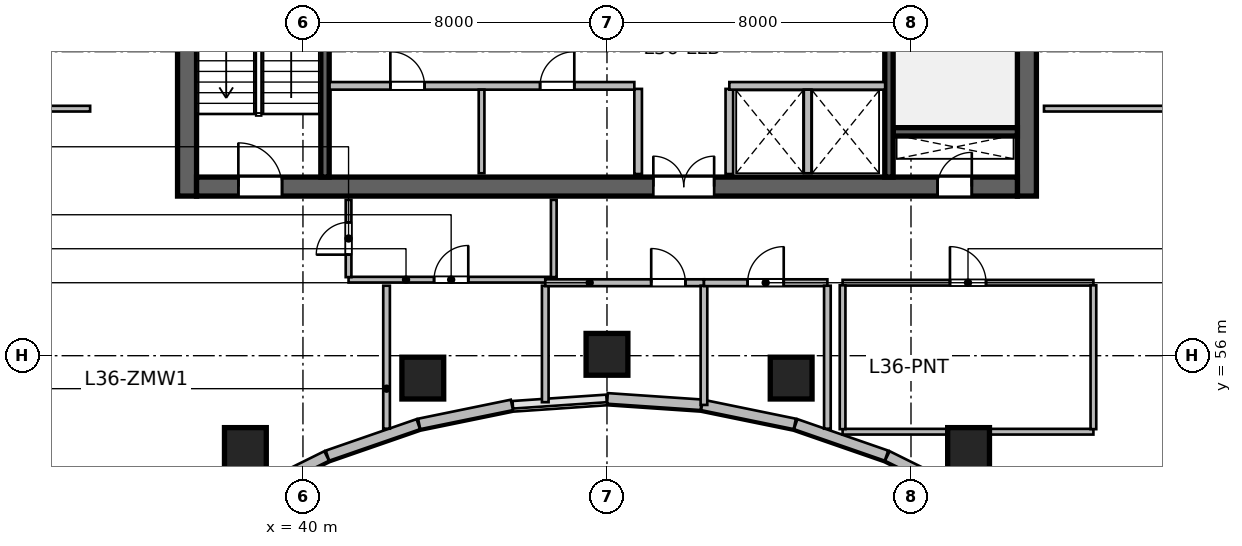
"""IFC4 building model, lengths in metres.
Left out: names, types, materials, properties, quantities, classifications, styles, units other than length and angle.
Written with IfcOpenShell. Run it as: python <this file> out.ifc"""

import sys

from ifc_helpers import new_model, si_unit, direction, frame, frame_2d, origin, origin_2d, place, context, subcontext, project, spatial, rectangle, circle, extrude, source, transform, mapped, element, fill, save


model = new_model("IFC4")
c1 = context("Model", 3, precision=1e-05, world=origin(), true_north=direction((0.0, 1.0)))
c2 = subcontext(c1, "Body", "Model", "MODEL_VIEW")
j1 = project(units=[si_unit("LENGTHUNIT", "METRE"), si_unit("PLANEANGLEUNIT", "RADIAN")], contexts=[c1])
p1 = place(None, origin())
s1 = spatial("IfcSite", under=j1, at=p1, CompositionType="ELEMENT")
p2 = place(p1, origin())
s2 = spatial("IfcBuilding", under=s1, at=p2, CompositionType="ELEMENT")
p3 = place(p2, frame((0.0, 0.0, 150.6)))
s3 = spatial("IfcBuildingStorey", under=s2, at=p3, CompositionType="ELEMENT", Elevation=150.6)
m1 = source(origin(), c2, "Body", "SweptSolid", [
    extrude(rectangle(XDim=12.0, YDim=0.5, at=frame_2d((6.0, 0.0))), origin(), (0.0, 0.0, 1.0), 3.9),
])
for number, where, z_axis, x_axis in (
    (1, (36.95, 60.2, 0.0), (0.0, 0.0, 1.0), (0.0, 1.0, 0.0)),
    (2, (59.05, 60.2, 0.0), (0.0, 0.0, 1.0), (0.0, 1.0, 0.0)),
):
    element("IfcWall", number, at=place(p3, frame(where, z_axis=z_axis, x_axis=x_axis)), inside=s3, PredefinedType="SHEAR", context=c2, shape_type="MappedRepresentation", body=[
        mapped(m1, transform((0.0, 0.0, 0.0), scale=1.0)),
    ])
m2 = source(origin(), c2, "Body", "SweptSolid", [
    extrude(rectangle(XDim=21.6, YDim=0.5, at=frame_2d((10.8, 0.0))), origin(), (0.0, 0.0, 1.0), 3.9),
])
p4 = place(p3, frame((37.2, 60.45, 0.0), z_axis=(0.0, 0.0, 1.0), x_axis=(1.0, 0.0, 0.0)))
e3 = element("IfcWall", 3, at=p4, inside=s3, PredefinedType="SHEAR", context=c2, shape_type="MappedRepresentation", body=[
    mapped(m2, transform((0.0, 0.0, 0.0), scale=1.0)),
])
p5 = place(p4, frame((1.1, 0.0, 0.0)))
e4 = element("IfcOpeningElement", 4, at=p5, cuts=e3, PredefinedType="OPENING", context=c2, shape_type="SweptSolid", body=[
    extrude(rectangle(XDim=1.15, YDim=2.15, at=frame_2d((0.575, 1.075))), frame((0.0, 0.26, 0.0), z_axis=(0.0, -1.0, 0.0), x_axis=(1.0, 0.0, 0.0)), (0.0, 0.0, 1.0), 0.52),
])
p6 = place(p4, frame((19.5, 0.0, 0.0)))
e5 = element("IfcOpeningElement", 5, at=p6, cuts=e3, PredefinedType="OPENING", context=c2, shape_type="SweptSolid", body=[
    extrude(rectangle(XDim=0.9, YDim=2.1, at=frame_2d((0.45, 1.05))), frame((0.0, 0.26, 0.0), z_axis=(0.0, -1.0, 0.0), x_axis=(1.0, 0.0, 0.0)), (0.0, 0.0, 1.0), 0.52),
])
p7 = place(p4, frame((12.02, 0.0, 0.0)))
e6 = element("IfcOpeningElement", 6, at=p7, cuts=e3, PredefinedType="OPENING", context=c2, shape_type="SweptSolid", body=[
    extrude(rectangle(XDim=1.6, YDim=2.15, at=frame_2d((0.8, 1.075))), frame((0.0, 0.26, 0.0), z_axis=(0.0, -1.0, 0.0), x_axis=(1.0, 0.0, 0.0)), (0.0, 0.0, 1.0), 0.52),
])
m3 = source(origin(), c2, "Body", "SweptSolid", [
    extrude(rectangle(XDim=3.27, YDim=0.22, at=frame_2d((1.635, 0.0))), origin(), (0.0, 0.0, 1.0), 3.9),
])
p8 = place(p3, frame((55.53, 61.89, 0.0), z_axis=(0.0, 0.0, 1.0), x_axis=(1.0, 0.0, 0.0)))
e7 = element("IfcWall", 7, at=p8, inside=s3, PredefinedType="SHEAR", context=c2, shape_type="MappedRepresentation", body=[
    mapped(m3, transform((0.0, 0.0, 0.0), scale=1.0)),
])
m4 = source(origin(), c2, "Body", "SweptSolid", [
    extrude(rectangle(XDim=11.0, YDim=0.22, at=frame_2d((5.5, 0.0))), origin(), (0.0, 0.0, 1.0), 3.9),
])
p9 = place(p3, frame((40.58, 60.7, 0.0), z_axis=(0.0, 0.0, 1.0), x_axis=(0.0, 1.0, 0.0)))
e8 = element("IfcWall", 8, at=p9, inside=s3, PredefinedType="SHEAR", context=c2, shape_type="MappedRepresentation", body=[
    mapped(m4, transform((0.0, 0.0, 0.0), scale=1.0)),
])
p10 = place(p3, frame((55.42, 60.7, 0.0), z_axis=(0.0, 0.0, 1.0), x_axis=(0.0, 1.0, 0.0)))
e9 = element("IfcWall", 9, at=p10, inside=s3, PredefinedType="SHEAR", context=c2, shape_type="MappedRepresentation", body=[
    mapped(m4, transform((0.0, 0.0, 0.0), scale=1.0)),
])
p11 = place(p10, frame((9.545, 0.0, 0.0)))
e10 = element("IfcOpeningElement", 10, at=p11, cuts=e9, PredefinedType="OPENING", context=c2, shape_type="SweptSolid", body=[
    extrude(rectangle(XDim=1.15, YDim=2.15, at=frame_2d((0.575, 1.075))), frame((0.0, 0.12, 0.0), z_axis=(0.0, -1.0, 0.0), x_axis=(1.0, 0.0, 0.0)), (0.0, 0.0, 1.0), 0.24),
])
m5 = source(origin(), c2, "Body", "SweptSolid", [
    extrude(circle(Radius=0.55, at=origin_2d()), origin(), (0.0, 0.0, 1.0), 3.9),
])
for number, where, z_axis, x_axis in (
    (11, (38.485, 53.558, 0.0), (0.0, 0.0, 1.0), (-0.289, 0.957, 0.0)),
    (12, (43.154, 55.411, 0.0), (0.0, 0.0, 1.0), (-0.143, 0.99, 0.0)),
    (13, (48.0, 56.036, 0.0), (0.0, 0.0, 1.0), (0.0, 1.0, 0.0)),
    (14, (52.846, 55.411, 0.0), (0.0, 0.0, 1.0), (0.143, 0.99, 0.0)),
    (15, (57.515, 53.558, 0.0), (0.0, 0.0, 1.0), (0.289, 0.957, 0.0)),
):
    element("IfcColumn", number, at=place(p3, frame(where, z_axis=z_axis, x_axis=x_axis)), inside=s3, PredefinedType="COLUMN", context=c2, shape_type="MappedRepresentation", body=[
        mapped(m5, transform((0.0, 0.0, 0.0), scale=1.0)),
    ])
m6 = source(origin(), c2, "Body", "SweptSolid", [
    extrude(rectangle(XDim=2.584, YDim=0.28, at=frame_2d((1.292, 0.0))), origin(), (0.0, 0.0, 1.0), 3.65),
])
p12 = place(p3, frame((57.692, 52.213, 0.0), z_axis=(0.0, 0.0, 1.0), x_axis=(-0.895989792847, 0.44407464588, 0.0)))
e16 = element("IfcWall", 16, at=p12, inside=s3, PredefinedType="SOLIDWALL", context=c2, shape_type="MappedRepresentation", body=[
    mapped(m6, transform((0.0, 0.0, 0.0), scale=1.0)),
])
m7 = source(origin(), c2, "Body", "SweptSolid", [
    extrude(rectangle(XDim=2.53, YDim=0.28, at=frame_2d((1.265, 0.0))), origin(), (0.0, 0.0, 1.0), 3.65),
])
p13 = place(p3, frame((55.355, 53.37, 0.0), z_axis=(0.0, 0.0, 1.0), x_axis=(-0.944872429646, 0.327438683872, 0.0)))
e17 = element("IfcWall", 17, at=p13, inside=s3, PredefinedType="SOLIDWALL", context=c2, shape_type="MappedRepresentation", body=[
    mapped(m7, transform((0.0, 0.0, 0.0), scale=1.0)),
])
m8 = source(origin(), c2, "Body", "SweptSolid", [
    extrude(rectangle(XDim=2.491, YDim=0.28, at=frame_2d((1.246, 0.0))), origin(), (0.0, 0.0, 1.0), 3.65),
])
p14 = place(p3, frame((52.942, 54.205, 0.0), z_axis=(0.0, 0.0, 1.0), x_axis=(-0.979630885979, 0.200806691214, 0.0)))
e18 = element("IfcWall", 18, at=p14, inside=s3, PredefinedType="SOLIDWALL", context=c2, shape_type="MappedRepresentation", body=[
    mapped(m8, transform((0.0, 0.0, 0.0), scale=1.0)),
])
m9 = source(origin(), c2, "Body", "SweptSolid", [
    extrude(rectangle(XDim=2.471, YDim=0.28, at=frame_2d((1.236, 0.0))), origin(), (0.0, 0.0, 1.0), 3.65),
])
p15 = place(p3, frame((50.478, 54.708, 0.0), z_axis=(0.0, 0.0, 1.0), x_axis=(-0.997708006929, 0.067666335123, 0.0)))
e19 = element("IfcWall", 19, at=p15, inside=s3, PredefinedType="SOLIDWALL", context=c2, shape_type="MappedRepresentation", body=[
    mapped(m9, transform((0.0, 0.0, 0.0), scale=1.0)),
])
p16 = place(p3, frame((45.498, 54.705, 0.0), z_axis=(0.0, 0.0, 1.0), x_axis=(-0.979630885979, -0.200806691214, 0.0)))
e20 = element("IfcWall", 20, at=p16, inside=s3, PredefinedType="SOLIDWALL", context=c2, shape_type="MappedRepresentation", body=[
    mapped(m8, transform((0.0, 0.0, 0.0), scale=1.0)),
])
p17 = place(p3, frame((43.035, 54.198, 0.0), z_axis=(0.0, 0.0, 1.0), x_axis=(-0.944872429646, -0.327438683872, 0.0)))
e21 = element("IfcWall", 21, at=p17, inside=s3, PredefinedType="SOLIDWALL", context=c2, shape_type="MappedRepresentation", body=[
    mapped(m7, transform((0.0, 0.0, 0.0), scale=1.0)),
])
p18 = place(p3, frame((40.624, 53.361, 0.0), z_axis=(0.0, 0.0, 1.0), x_axis=(-0.895989792847, -0.44407464588, 0.0)))
e22 = element("IfcWall", 22, at=p18, inside=s3, PredefinedType="SOLIDWALL", context=c2, shape_type="MappedRepresentation", body=[
    mapped(m6, transform((0.0, 0.0, 0.0), scale=1.0)),
])
m10 = source(origin(), c2, "Body", "SweptSolid", [
    extrude(rectangle(XDim=2.24, YDim=0.2, at=frame_2d((1.12, 0.0))), origin(), (0.0, 0.0, 1.0), 3.65),
])
for number, where, z_axis, x_axis in (
    (23, (48.82, 60.78, 0.0), (0.0, 0.0, 1.0), (0.0, 1.0, 0.0)),
    (24, (51.22, 60.78, 0.0), (0.0, 0.0, 1.0), (0.0, 1.0, 0.0)),
):
    element("IfcWall", number, at=place(p3, frame(where, z_axis=z_axis, x_axis=x_axis)), inside=s3, PredefinedType="SOLIDWALL", context=c2, shape_type="MappedRepresentation", body=[
        mapped(m10, transform((0.0, 0.0, 0.0), scale=1.0)),
    ])
m11 = source(origin(), c2, "Body", "SweptSolid", [
    extrude(rectangle(XDim=8.02, YDim=0.2, at=frame_2d((4.01, 0.0))), origin(), (0.0, 0.0, 1.0), 3.65),
])
p19 = place(p3, frame((40.7, 63.1, 0.0), z_axis=(0.0, 0.0, 1.0), x_axis=(1.0, 0.0, 0.0)))
e25 = element("IfcWall", 25, at=p19, inside=s3, PredefinedType="SOLIDWALL", context=c2, shape_type="MappedRepresentation", body=[
    mapped(m11, transform((0.0, 0.0, 0.0), scale=1.0)),
])
p20 = place(p19, frame((1.6, 0.0, 0.0)))
e26 = element("IfcOpeningElement", 26, at=p20, cuts=e25, PredefinedType="OPENING", context=c2, shape_type="SweptSolid", body=[
    extrude(rectangle(XDim=0.9, YDim=2.1, at=frame_2d((0.45, 1.05))), frame((0.0, 0.11, 0.0), z_axis=(0.0, -1.0, 0.0), x_axis=(1.0, 0.0, 0.0)), (0.0, 0.0, 1.0), 0.22),
])
p21 = place(p19, frame((5.54, 0.0, 0.0)))
e27 = element("IfcOpeningElement", 27, at=p21, cuts=e25, PredefinedType="OPENING", context=c2, shape_type="SweptSolid", body=[
    extrude(rectangle(XDim=0.9, YDim=2.1, at=frame_2d((0.45, 1.05))), frame((0.0, 0.11, 0.0), z_axis=(0.0, -1.0, 0.0), x_axis=(1.0, 0.0, 0.0)), (0.0, 0.0, 1.0), 0.22),
])
m12 = source(origin(), c2, "Body", "SweptSolid", [
    extrude(rectangle(XDim=4.1, YDim=0.2, at=frame_2d((2.05, 0.0))), origin(), (0.0, 0.0, 1.0), 3.65),
])
p22 = place(p3, frame((51.22, 63.1, 0.0), z_axis=(0.0, 0.0, 1.0), x_axis=(1.0, 0.0, 0.0)))
e28 = element("IfcWall", 28, at=p22, inside=s3, PredefinedType="SOLIDWALL", context=c2, shape_type="MappedRepresentation", body=[
    mapped(m12, transform((0.0, 0.0, 0.0), scale=1.0)),
])
m13 = source(origin(), c2, "Body", "SweptSolid", [
    extrude(rectangle(XDim=2.2, YDim=0.15, at=frame_2d((1.1, 0.0))), origin(), (0.0, 0.0, 1.0), 3.65),
])
p23 = place(p3, frame((44.7, 60.8, 0.0), z_axis=(0.0, 0.0, 1.0), x_axis=(0.0, 1.0, 0.0)))
e29 = element("IfcWall", 29, at=p23, inside=s3, PredefinedType="PARTITIONING", context=c2, shape_type="MappedRepresentation", body=[
    mapped(m13, transform((0.0, 0.0, 0.0), scale=1.0)),
])
m14 = source(origin(), c2, "Body", "SweptSolid", [
    extrude(rectangle(XDim=2.2, YDim=0.2, at=frame_2d((1.1, 0.0))), origin(), (0.0, 0.0, 1.0), 3.65),
])
p24 = place(p3, frame((53.28, 60.8, 0.0), z_axis=(0.0, 0.0, 1.0), x_axis=(0.0, 1.0, 0.0)))
e30 = element("IfcWall", 30, at=p24, inside=s3, PredefinedType="SOLIDWALL", context=c2, shape_type="MappedRepresentation", body=[
    mapped(m14, transform((0.0, 0.0, 0.0), scale=1.0)),
])
m15 = source(origin(), c2, "Body", "SweptSolid", [
    extrude(rectangle(XDim=5.4, YDim=0.15, at=frame_2d((2.7, 0.0))), origin(), (0.0, 0.0, 1.0), 3.65),
])
p25 = place(p3, frame((41.2, 58.0, 0.0), z_axis=(0.0, 0.0, 1.0), x_axis=(1.0, 0.0, 0.0)))
e31 = element("IfcWall", 31, at=p25, inside=s3, PredefinedType="PARTITIONING", context=c2, shape_type="MappedRepresentation", body=[
    mapped(m15, transform((0.0, 0.0, 0.0), scale=1.0)),
])
p26 = place(p25, frame((2.25, 0.0, 0.0)))
e32 = element("IfcOpeningElement", 32, at=p26, cuts=e31, PredefinedType="OPENING", context=c2, shape_type="SweptSolid", body=[
    extrude(rectangle(XDim=0.9, YDim=2.08, at=frame_2d((0.45, 1.04))), frame((0.0, 0.085, 0.0), z_axis=(0.0, -1.0, 0.0), x_axis=(1.0, 0.0, 0.0)), (0.0, 0.0, 1.0), 0.17),
])
m16 = source(origin(), c2, "Body", "SweptSolid", [
    extrude(rectangle(XDim=2.033, YDim=0.15, at=frame_2d((1.016, 0.0))), origin(), (0.0, 0.0, 1.0), 3.65),
])
p27 = place(p3, frame((41.2, 58.067, 0.0), z_axis=(0.0, 0.0, 1.0), x_axis=(0.0, 1.0, 0.0)))
e33 = element("IfcWall", 33, at=p27, inside=s3, PredefinedType="PARTITIONING", context=c2, shape_type="MappedRepresentation", body=[
    mapped(m16, transform((0.0, 0.0, 0.0), scale=1.0)),
])
p28 = place(p27, frame((0.591, 0.0, 0.0)))
e34 = element("IfcOpeningElement", 34, at=p28, cuts=e33, PredefinedType="OPENING", context=c2, shape_type="SweptSolid", body=[
    extrude(rectangle(XDim=0.85, YDim=2.1, at=frame_2d((0.425, 1.05))), frame((0.0, 0.085, 0.0), z_axis=(0.0, -1.0, 0.0), x_axis=(1.0, 0.0, 0.0)), (0.0, 0.0, 1.0), 0.17),
])
p29 = place(p3, frame((46.6, 58.067, 0.0), z_axis=(0.0, 0.0, 1.0), x_axis=(0.0, 1.0, 0.0)))
e35 = element("IfcWall", 35, at=p29, inside=s3, PredefinedType="PARTITIONING", context=c2, shape_type="MappedRepresentation", body=[
    mapped(m16, transform((0.0, 0.0, 0.0), scale=1.0)),
])
m17 = source(origin(), c2, "Body", "SweptSolid", [
    extrude(rectangle(XDim=3.763, YDim=0.175, at=frame_2d((1.881, 0.0))), origin(), (0.0, 0.0, 1.0), 3.65),
])
p30 = place(p3, frame((42.2, 54.079, 0.0), z_axis=(0.0, 0.0, 1.0), x_axis=(0.0, 1.0, 0.0)))
e36 = element("IfcWall", 36, at=p30, inside=s3, PredefinedType="PARTITIONING", context=c2, shape_type="MappedRepresentation", body=[
    mapped(m17, transform((0.0, 0.0, 0.0), scale=1.0)),
])
m18 = source(origin(), c2, "Body", "SweptSolid", [
    extrude(rectangle(XDim=3.065, YDim=0.175, at=frame_2d((1.533, 0.0))), origin(), (0.0, 0.0, 1.0), 3.65),
])
p31 = place(p3, frame((46.376, 54.776, 0.0), z_axis=(0.0, 0.0, 1.0), x_axis=(0.0, 1.0, 0.0)))
e37 = element("IfcWall", 37, at=p31, inside=s3, PredefinedType="PARTITIONING", context=c2, shape_type="MappedRepresentation", body=[
    mapped(m18, transform((0.0, 0.0, 0.0), scale=1.0)),
])
m19 = source(origin(), c2, "Body", "SweptSolid", [
    extrude(rectangle(XDim=4.176, YDim=0.18, at=frame_2d((2.088, 0.0))), origin(), (0.0, 0.0, 1.0), 3.65),
])
p32 = place(p3, frame((46.376, 57.92, 0.0), z_axis=(0.0, 0.0, 1.0), x_axis=(1.0, 0.0, 0.0)))
e38 = element("IfcWall", 38, at=p32, inside=s3, PredefinedType="PLUMBINGWALL", context=c2, shape_type="MappedRepresentation", body=[
    mapped(m19, transform((0.0, 0.0, 0.0), scale=1.0)),
])
p33 = place(p32, frame((2.788, 0.0, 0.0)))
e39 = element("IfcOpeningElement", 39, at=p33, cuts=e38, PredefinedType="OPENING", context=c2, shape_type="SweptSolid", body=[
    extrude(rectangle(XDim=0.9, YDim=2.08, at=frame_2d((0.45, 1.04))), frame((0.0, 0.1, 0.0), z_axis=(0.0, -1.0, 0.0), x_axis=(1.0, 0.0, 0.0)), (0.0, 0.0, 1.0), 0.2),
])
m20 = source(origin(), c2, "Body", "SweptSolid", [
    extrude(rectangle(XDim=3.136, YDim=0.175, at=frame_2d((1.568, 0.0))), origin(), (0.0, 0.0, 1.0), 3.65),
])
p34 = place(p3, frame((50.552, 54.705, 0.0), z_axis=(0.0, 0.0, 1.0), x_axis=(0.0, 1.0, 0.0)))
e40 = element("IfcWall", 40, at=p34, inside=s3, PredefinedType="PARTITIONING", context=c2, shape_type="MappedRepresentation", body=[
    mapped(m20, transform((0.0, 0.0, 0.0), scale=1.0)),
])
m21 = source(origin(), c2, "Body", "SweptSolid", [
    extrude(rectangle(XDim=3.248, YDim=0.18, at=frame_2d((1.624, 0.0))), origin(), (0.0, 0.0, 1.0), 3.65),
])
p35 = place(p3, frame((50.552, 57.92, 0.0), z_axis=(0.0, 0.0, 1.0), x_axis=(1.0, 0.0, 0.0)))
e41 = element("IfcWall", 41, at=p35, inside=s3, PredefinedType="PLUMBINGWALL", context=c2, shape_type="MappedRepresentation", body=[
    mapped(m21, transform((0.0, 0.0, 0.0), scale=1.0)),
])
p36 = place(p35, frame((1.149, 0.0, 0.0)))
e42 = element("IfcOpeningElement", 42, at=p36, cuts=e41, PredefinedType="OPENING", context=c2, shape_type="SweptSolid", body=[
    extrude(rectangle(XDim=0.95, YDim=2.12, at=frame_2d((0.475, 1.06))), frame((0.0, 0.1, 0.0), z_axis=(0.0, -1.0, 0.0), x_axis=(1.0, 0.0, 0.0)), (0.0, 0.0, 1.0), 0.2),
])
p37 = place(p3, frame((53.8, 54.079, 0.0), z_axis=(0.0, 0.0, 1.0), x_axis=(0.0, 1.0, 0.0)))
e43 = element("IfcWall", 43, at=p37, inside=s3, PredefinedType="PARTITIONING", context=c2, shape_type="MappedRepresentation", body=[
    mapped(m17, transform((0.0, 0.0, 0.0), scale=1.0)),
])
m22 = source(origin(), c2, "Body", "SweptSolid", [
    extrude(rectangle(XDim=6.6, YDim=0.15, at=frame_2d((3.3, 0.0))), origin(), (0.0, 0.0, 1.0), 3.095),
])
p38 = place(p3, frame((54.2, 54.0, 0.0), z_axis=(0.0, 0.0, 1.0), x_axis=(1.0, 0.0, 0.0)))
e44 = element("IfcWall", 44, at=p38, inside=s3, PredefinedType="PARTITIONING", context=c2, shape_type="MappedRepresentation", body=[
    mapped(m22, transform((0.0, 0.0, 0.0), scale=1.0)),
])
m23 = source(origin(), c2, "Body", "SweptSolid", [
    extrude(rectangle(XDim=6.6, YDim=0.15, at=frame_2d((3.3, 0.0))), origin(), (0.0, 0.0, 1.0), 3.65),
])
p39 = place(p3, frame((54.2, 57.92, 0.0), z_axis=(0.0, 0.0, 1.0), x_axis=(1.0, 0.0, 0.0)))
e45 = element("IfcWall", 45, at=p39, inside=s3, PredefinedType="PARTITIONING", context=c2, shape_type="MappedRepresentation", body=[
    mapped(m23, transform((0.0, 0.0, 0.0), scale=1.0)),
])
p40 = place(p39, frame((2.825, 0.0, 0.0)))
e46 = element("IfcOpeningElement", 46, at=p40, cuts=e45, PredefinedType="OPENING", context=c2, shape_type="SweptSolid", body=[
    extrude(rectangle(XDim=0.95, YDim=2.1, at=frame_2d((0.475, 1.05))), frame((0.0, 0.085, 0.0), z_axis=(0.0, -1.0, 0.0), x_axis=(1.0, 0.0, 0.0)), (0.0, 0.0, 1.0), 0.17),
])
m24 = source(origin(), c2, "Body", "SweptSolid", [
    extrude(rectangle(XDim=3.785, YDim=0.15, at=frame_2d((1.893, 0.0))), origin(), (0.0, 0.0, 1.0), 3.65),
])
for number, where, z_axis, x_axis in (
    (47, (54.2, 54.067, 0.0), (0.0, 0.0, 1.0), (0.0, 1.0, 0.0)),
    (48, (60.8, 54.067, 0.0), (0.0, 0.0, 1.0), (0.0, 1.0, 0.0)),
):
    element("IfcWall", number, at=place(p3, frame(where, z_axis=z_axis, x_axis=x_axis)), inside=s3, PredefinedType="PARTITIONING", context=c2, shape_type="MappedRepresentation", body=[
        mapped(m24, transform((0.0, 0.0, 0.0), scale=1.0)),
    ])
m25 = source(origin(), c2, "Body", "SweptSolid", [
    extrude(rectangle(XDim=2.46, YDim=0.15, at=frame_2d((1.23, 0.0))), origin(), (0.0, 0.0, 1.0), 3.65),
])
p41 = place(p3, frame((31.94, 62.5, 0.0), z_axis=(0.0, 0.0, 1.0), x_axis=(1.0, 0.0, 0.0)))
e49 = element("IfcWall", 49, at=p41, inside=s3, PredefinedType="PARTITIONING", context=c2, shape_type="MappedRepresentation", body=[
    mapped(m25, transform((0.0, 0.0, 0.0), scale=1.0)),
])
m26 = source(origin(), c2, "Body", "SweptSolid", [
    extrude(rectangle(XDim=4.56, YDim=0.15, at=frame_2d((2.28, 0.0))), origin(), (0.0, 0.0, 1.0), 3.65),
])
p42 = place(p3, frame((59.5, 62.5, 0.0), z_axis=(0.0, 0.0, 1.0), x_axis=(1.0, 0.0, 0.0)))
e50 = element("IfcWall", 50, at=p42, inside=s3, PredefinedType="PARTITIONING", context=c2, shape_type="MappedRepresentation", body=[
    mapped(m26, transform((0.0, 0.0, 0.0), scale=1.0)),
])
m27 = source(origin(), c2, "Body", "SweptSolid", [
    extrude(rectangle(XDim=1.15, YDim=2.15, at=frame_2d((0.575, 1.075))), frame((0.0, 0.025, 0.0), z_axis=(0.0, -1.0, 0.0), x_axis=(1.0, 0.0, 0.0)), (0.0, 0.0, 1.0), 0.05),
])
p43 = place(p5, origin())
e51 = element("IfcDoor", 51, at=p43, inside=s3, OperationType="SINGLE_SWING_LEFT", PredefinedType="DOOR", context=c2, shape_type="MappedRepresentation", body=[
    mapped(m27, transform((0.0, 0.0, 0.0), scale=1.0)),
])
fill(e4, e51)
m28 = source(origin(), c2, "Body", "SweptSolid", [
    extrude(rectangle(XDim=0.9, YDim=2.1, at=frame_2d((0.45, 1.05))), frame((0.0, 0.025, 0.0), z_axis=(0.0, -1.0, 0.0), x_axis=(1.0, 0.0, 0.0)), (0.0, 0.0, 1.0), 0.05),
])
p44 = place(p6, origin())
e52 = element("IfcDoor", 52, at=p44, inside=s3, OperationType="SINGLE_SWING_RIGHT", PredefinedType="DOOR", context=c2, shape_type="MappedRepresentation", body=[
    mapped(m28, transform((0.0, 0.0, 0.0), scale=1.0)),
])
fill(e5, e52)
m29 = source(origin(), c2, "Body", "SweptSolid", [
    extrude(rectangle(XDim=1.6, YDim=2.15, at=frame_2d((0.8, 1.075))), frame((0.0, 0.025, 0.0), z_axis=(0.0, -1.0, 0.0), x_axis=(1.0, 0.0, 0.0)), (0.0, 0.0, 1.0), 0.05),
])
p45 = place(p7, origin())
e53 = element("IfcDoor", 53, at=p45, inside=s3, OperationType="DOUBLE_DOOR_SINGLE_SWING", PredefinedType="DOOR", context=c2, shape_type="MappedRepresentation", body=[
    mapped(m29, transform((0.0, 0.0, 0.0), scale=1.0)),
])
fill(e6, e53)
p46 = place(p20, origin())
e54 = element("IfcDoor", 54, at=p46, inside=s3, OperationType="SINGLE_SWING_LEFT", PredefinedType="DOOR", context=c2, shape_type="MappedRepresentation", body=[
    mapped(m28, transform((0.0, 0.0, 0.0), scale=1.0)),
])
fill(e26, e54)
p47 = place(p21, origin())
e55 = element("IfcDoor", 55, at=p47, inside=s3, OperationType="SINGLE_SWING_RIGHT", PredefinedType="DOOR", context=c2, shape_type="MappedRepresentation", body=[
    mapped(m28, transform((0.0, 0.0, 0.0), scale=1.0)),
])
fill(e27, e55)
m30 = source(origin(), c2, "Body", "SweptSolid", [
    extrude(rectangle(XDim=0.85, YDim=2.1, at=frame_2d((0.425, 1.05))), frame((0.0, 0.025, 0.0), z_axis=(0.0, -1.0, 0.0), x_axis=(1.0, 0.0, 0.0)), (0.0, 0.0, 1.0), 0.05),
])
p48 = place(p28, origin())
e56 = element("IfcDoor", 56, at=p48, inside=s3, OperationType="SINGLE_SWING_LEFT", PredefinedType="DOOR", context=c2, shape_type="MappedRepresentation", body=[
    mapped(m30, transform((0.0, 0.0, 0.0), scale=1.0)),
])
fill(e34, e56)
m31 = source(origin(), c2, "Body", "SweptSolid", [
    extrude(rectangle(XDim=0.9, YDim=2.08, at=frame_2d((0.45, 1.04))), frame((0.0, 0.025, 0.0), z_axis=(0.0, -1.0, 0.0), x_axis=(1.0, 0.0, 0.0)), (0.0, 0.0, 1.0), 0.05),
])
p49 = place(p26, origin())
e57 = element("IfcDoor", 57, at=p49, inside=s3, OperationType="SINGLE_SWING_RIGHT", PredefinedType="DOOR", context=c2, shape_type="MappedRepresentation", body=[
    mapped(m31, transform((0.0, 0.0, 0.0), scale=1.0)),
])
fill(e32, e57)
p50 = place(p33, origin())
e58 = element("IfcDoor", 58, at=p50, inside=s3, OperationType="SINGLE_SWING_LEFT", PredefinedType="DOOR", context=c2, shape_type="MappedRepresentation", body=[
    mapped(m31, transform((0.0, 0.0, 0.0), scale=1.0)),
])
fill(e39, e58)
m32 = source(origin(), c2, "Body", "SweptSolid", [
    extrude(rectangle(XDim=0.95, YDim=2.12, at=frame_2d((0.475, 1.06))), frame((0.0, 0.025, 0.0), z_axis=(0.0, -1.0, 0.0), x_axis=(1.0, 0.0, 0.0)), (0.0, 0.0, 1.0), 0.05),
])
p51 = place(p36, origin())
e59 = element("IfcDoor", 59, at=p51, inside=s3, OperationType="SINGLE_SWING_RIGHT", PredefinedType="DOOR", context=c2, shape_type="MappedRepresentation", body=[
    mapped(m32, transform((0.0, 0.0, 0.0), scale=1.0)),
])
fill(e42, e59)
m33 = source(origin(), c2, "Body", "SweptSolid", [
    extrude(rectangle(XDim=0.95, YDim=2.1, at=frame_2d((0.475, 1.05))), frame((0.0, 0.025, 0.0), z_axis=(0.0, -1.0, 0.0), x_axis=(1.0, 0.0, 0.0)), (0.0, 0.0, 1.0), 0.05),
])
p52 = place(p40, origin())
e60 = element("IfcDoor", 60, at=p52, inside=s3, OperationType="SINGLE_SWING_LEFT", PredefinedType="DOOR", context=c2, shape_type="MappedRepresentation", body=[
    mapped(m33, transform((0.0, 0.0, 0.0), scale=1.0)),
])
fill(e46, e60)
save(model, sys.argv[1])
